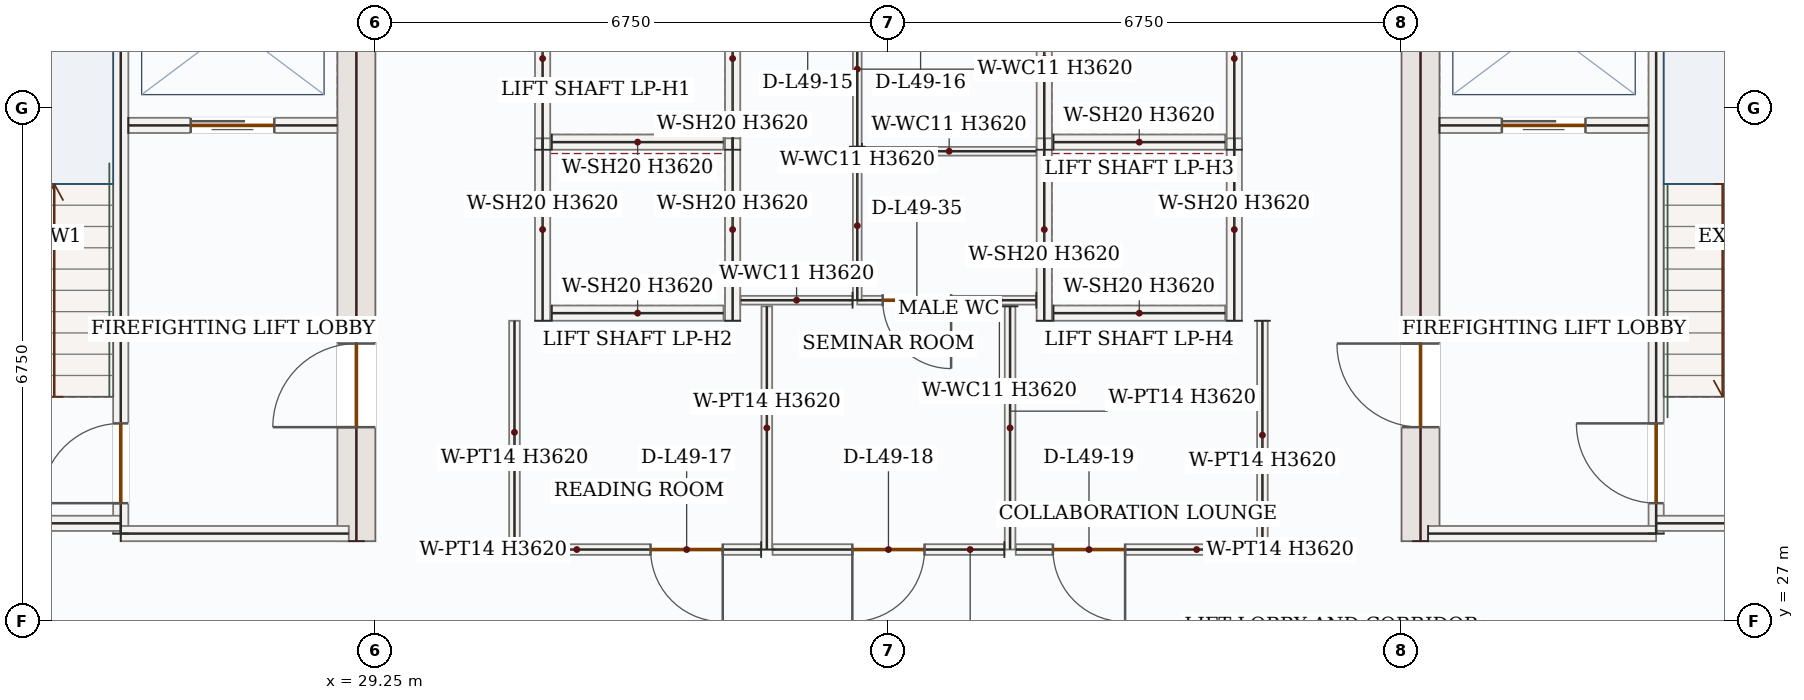
"""IFC4 building model, lengths in metres.
Left out: names, types, materials, properties, quantities, classifications, styles, units other than length and angle.
Written with IfcOpenShell. Run it as: python <this file> out.ifc"""

import sys

from ifc_helpers import new_model, si_unit, direction, frame, frame_2d, origin, place, context, subcontext, project, spatial, rectangle, extrude, source, transform, mapped, element, fill, save


model = new_model("IFC4")
c1 = context("Model", 3, precision=1e-05, world=origin(), true_north=direction((0.0, 1.0)))
c2 = subcontext(c1, "Body", "Model", "MODEL_VIEW")
j1 = project(units=[si_unit("LENGTHUNIT", "METRE"), si_unit("PLANEANGLEUNIT", "RADIAN")], contexts=[c1])
p1 = place(None, origin())
s1 = spatial("IfcSite", under=j1, at=p1, CompositionType="ELEMENT")
p2 = place(p1, origin())
s2 = spatial("IfcBuilding", under=s1, at=p2, CompositionType="ELEMENT")
p3 = place(p2, frame((0.0, 0.0, 209.7)))
s3 = spatial("IfcBuildingStorey", under=s2, at=p3, CompositionType="ELEMENT", Elevation=209.7)
p4 = place(p3, frame((29.0, 28.05, 0.0), z_axis=(0.0, 0.0, 1.0), x_axis=(0.0, 1.0, 0.0)))
e1 = element("IfcWall", 1, at=p4, inside=s3, PredefinedType="SHEAR", context=c2, shape_type="SweptSolid", body=[
    extrude(rectangle(XDim=8.55, YDim=0.5, at=frame_2d((4.275, 0.0))), origin(), (0.0, 0.0, 1.0), 3.62),
])
p5 = place(p4, frame((1.5, 0.0, 0.0)))
e2 = element("IfcOpeningElement", 2, at=p5, cuts=e1, PredefinedType="OPENING", context=c2, shape_type="SweptSolid", body=[
    extrude(rectangle(XDim=1.1, YDim=2.2, at=frame_2d((0.55, 1.1))), frame((0.0, 0.26, 0.0), z_axis=(0.0, -1.0, 0.0), x_axis=(1.0, 0.0, 0.0)), (0.0, 0.0, 1.0), 0.52),
])
p6 = place(p3, frame((43.0, 28.05, 0.0), z_axis=(0.0, 0.0, 1.0), x_axis=(0.0, 1.0, 0.0)))
e3 = element("IfcWall", 3, at=p6, inside=s3, PredefinedType="SHEAR", context=c2, shape_type="SweptSolid", body=[
    extrude(rectangle(XDim=8.55, YDim=0.5, at=frame_2d((4.275, 0.0))), origin(), (0.0, 0.0, 1.0), 3.62),
])
p7 = place(p6, frame((1.5, 0.0, 0.0)))
e4 = element("IfcOpeningElement", 4, at=p7, cuts=e3, PredefinedType="OPENING", context=c2, shape_type="SweptSolid", body=[
    extrude(rectangle(XDim=1.1, YDim=2.2, at=frame_2d((0.55, 1.1))), frame((0.0, 0.26, 0.0), z_axis=(0.0, -1.0, 0.0), x_axis=(1.0, 0.0, 0.0)), (0.0, 0.0, 1.0), 0.52),
])
p8 = place(p3, frame((25.9, 28.15, 0.0), z_axis=(0.0, 0.0, 1.0), x_axis=(0.0, 1.0, 0.0)))
e5 = element("IfcWall", 5, at=p8, inside=s3, PredefinedType="SOLIDWALL", context=c2, shape_type="SweptSolid", body=[
    extrude(rectangle(XDim=8.0, YDim=0.2, at=frame_2d((4.0, 0.0))), origin(), (0.0, 0.0, 1.0), 3.62),
])
p9 = place(p8, frame((0.4, 0.0, 0.0)))
e6 = element("IfcOpeningElement", 6, at=p9, cuts=e5, PredefinedType="OPENING", context=c2, shape_type="SweptSolid", body=[
    extrude(rectangle(XDim=1.05, YDim=2.15, at=frame_2d((0.525, 1.075))), frame((0.0, 0.11, 0.0), z_axis=(0.0, -1.0, 0.0), x_axis=(1.0, 0.0, 0.0)), (0.0, 0.0, 1.0), 0.22),
])
p10 = place(p3, frame((46.1, 28.15, 0.0), z_axis=(0.0, 0.0, 1.0), x_axis=(0.0, 1.0, 0.0)))
e7 = element("IfcWall", 7, at=p10, inside=s3, PredefinedType="SOLIDWALL", context=c2, shape_type="SweptSolid", body=[
    extrude(rectangle(XDim=8.0, YDim=0.2, at=frame_2d((4.0, 0.0))), origin(), (0.0, 0.0, 1.0), 3.62),
])
p11 = place(p10, frame((0.4, 0.0, 0.0)))
e8 = element("IfcOpeningElement", 8, at=p11, cuts=e7, PredefinedType="OPENING", context=c2, shape_type="SweptSolid", body=[
    extrude(rectangle(XDim=1.05, YDim=2.15, at=frame_2d((0.525, 1.075))), frame((0.0, 0.11, 0.0), z_axis=(0.0, -1.0, 0.0), x_axis=(1.0, 0.0, 0.0)), (0.0, 0.0, 1.0), 0.22),
])
m1 = source(origin(), c2, "Body", "SweptSolid", [
    extrude(rectangle(XDim=4.25, YDim=0.2, at=frame_2d((2.125, 0.0))), origin(), (0.0, 0.0, 1.0), 3.62),
])
p12 = place(p3, frame((21.65, 28.285, 0.0), z_axis=(0.0, 0.0, 1.0), x_axis=(1.0, 0.0, 0.0)))
e9 = element("IfcWall", 9, at=p12, inside=s3, PredefinedType="SOLIDWALL", context=c2, shape_type="MappedRepresentation", body=[
    mapped(m1, transform((0.0, 0.0, 0.0), x_axis=(1.0, 0.0, 0.0), y_axis=(0.0, 1.0, 0.0), z_axis=(0.0, 0.0, 1.0), scale=1.0)),
])
m2 = source(origin(), c2, "Body", "SweptSolid", [
    extrude(rectangle(XDim=3.0, YDim=0.2, at=frame_2d((1.5, 0.0))), origin(), (0.0, 0.0, 1.0), 3.62),
])
for number, where, z_axis, x_axis in (
    (10, (25.9, 28.15, 0.0), (0.0, 0.0, 1.0), (1.0, 0.0, 0.0)),
    (11, (43.1, 28.15, 0.0), (0.0, 0.0, 1.0), (1.0, 0.0, 0.0)),
):
    element("IfcWall", number, at=place(p3, frame(where, z_axis=z_axis, x_axis=x_axis)), inside=s3, PredefinedType="SOLIDWALL", context=c2, shape_type="MappedRepresentation", body=[
        mapped(m2, transform((0.0, 0.0, 0.0), x_axis=(1.0, 0.0, 0.0), y_axis=(0.0, 1.0, 0.0), z_axis=(0.0, 0.0, 1.0), scale=1.0)),
    ])
p13 = place(p3, frame((46.1, 28.285, 0.0), z_axis=(0.0, 0.0, 1.0), x_axis=(1.0, 0.0, 0.0)))
e12 = element("IfcWall", 12, at=p13, inside=s3, PredefinedType="SOLIDWALL", context=c2, shape_type="MappedRepresentation", body=[
    mapped(m1, transform((0.0, 0.0, 0.0), x_axis=(1.0, 0.0, 0.0), y_axis=(0.0, 1.0, 0.0), z_axis=(0.0, 0.0, 1.0), scale=1.0)),
])
p14 = place(p3, frame((26.0, 33.52, 0.0), z_axis=(0.0, 0.0, 1.0), x_axis=(1.0, 0.0, 0.0)))
e13 = element("IfcWall", 13, at=p14, inside=s3, PredefinedType="SOLIDWALL", context=c2, shape_type="SweptSolid", body=[
    extrude(rectangle(XDim=2.75, YDim=0.2, at=frame_2d((1.375, 0.0))), origin(), (0.0, 0.0, 1.0), 3.62),
])
p15 = place(p14, frame((0.82, 0.0, 0.0)))
e14 = element("IfcOpeningElement", 14, at=p15, cuts=e13, PredefinedType="OPENING", context=c2, shape_type="SweptSolid", body=[
    extrude(rectangle(XDim=1.1, YDim=2.15, at=frame_2d((0.55, 1.075))), frame((0.0, 0.11, 0.0), z_axis=(0.0, -1.0, 0.0), x_axis=(1.0, 0.0, 0.0)), (0.0, 0.0, 1.0), 0.22),
])
p16 = place(p3, frame((43.25, 33.52, 0.0), z_axis=(0.0, 0.0, 1.0), x_axis=(1.0, 0.0, 0.0)))
e15 = element("IfcWall", 15, at=p16, inside=s3, PredefinedType="SOLIDWALL", context=c2, shape_type="SweptSolid", body=[
    extrude(rectangle(XDim=2.75, YDim=0.2, at=frame_2d((1.375, 0.0))), origin(), (0.0, 0.0, 1.0), 3.62),
])
p17 = place(p16, frame((0.82, 0.0, 0.0)))
e16 = element("IfcOpeningElement", 16, at=p17, cuts=e15, PredefinedType="OPENING", context=c2, shape_type="SweptSolid", body=[
    extrude(rectangle(XDim=1.1, YDim=2.15, at=frame_2d((0.55, 1.075))), frame((0.0, 0.11, 0.0), z_axis=(0.0, -1.0, 0.0), x_axis=(1.0, 0.0, 0.0)), (0.0, 0.0, 1.0), 0.22),
])
m3 = source(origin(), c2, "Body", "SweptSolid", [
    extrude(rectangle(XDim=2.4, YDim=0.2, at=frame_2d((1.2, 0.0))), origin(), (0.0, 0.0, 1.0), 3.62),
])
for number, where, z_axis, x_axis in (
    (17, (31.45, 33.2, 0.0), (0.0, 0.0, 1.0), (0.0, 1.0, 0.0)),
    (18, (33.95, 33.2, 0.0), (0.0, 0.0, 1.0), (0.0, 1.0, 0.0)),
):
    element("IfcWall", number, at=place(p3, frame(where, z_axis=z_axis, x_axis=x_axis)), inside=s3, PredefinedType="SOLIDWALL", context=c2, shape_type="MappedRepresentation", body=[
        mapped(m3, transform((0.0, 0.0, 0.0), x_axis=(1.0, 0.0, 0.0), y_axis=(0.0, 1.0, 0.0), z_axis=(0.0, 0.0, 1.0), scale=1.0)),
    ])
m4 = source(origin(), c2, "Body", "SweptSolid", [
    extrude(rectangle(XDim=2.26, YDim=0.2, at=frame_2d((1.13, 0.0))), origin(), (0.0, 0.0, 1.0), 3.62),
])
p18 = place(p3, frame((31.57, 33.3, 0.0), z_axis=(0.0, 0.0, 1.0), x_axis=(1.0, 0.0, 0.0)))
e19 = element("IfcWall", 19, at=p18, inside=s3, PredefinedType="SOLIDWALL", context=c2, shape_type="MappedRepresentation", body=[
    mapped(m4, transform((0.0, 0.0, 0.0), x_axis=(1.0, 0.0, 0.0), y_axis=(0.0, 1.0, 0.0), z_axis=(0.0, 0.0, 1.0), scale=1.0)),
])
for number, where, z_axis, x_axis in (
    (20, (31.45, 30.95, 0.0), (0.0, 0.0, 1.0), (0.0, 1.0, 0.0)),
    (21, (33.95, 30.95, 0.0), (0.0, 0.0, 1.0), (0.0, 1.0, 0.0)),
):
    element("IfcWall", number, at=place(p3, frame(where, z_axis=z_axis, x_axis=x_axis)), inside=s3, PredefinedType="SOLIDWALL", context=c2, shape_type="MappedRepresentation", body=[
        mapped(m3, transform((0.0, 0.0, 0.0), x_axis=(1.0, 0.0, 0.0), y_axis=(0.0, 1.0, 0.0), z_axis=(0.0, 0.0, 1.0), scale=1.0)),
    ])
p19 = place(p3, frame((31.57, 31.05, 0.0), z_axis=(0.0, 0.0, 1.0), x_axis=(1.0, 0.0, 0.0)))
e22 = element("IfcWall", 22, at=p19, inside=s3, PredefinedType="SOLIDWALL", context=c2, shape_type="MappedRepresentation", body=[
    mapped(m4, transform((0.0, 0.0, 0.0), x_axis=(1.0, 0.0, 0.0), y_axis=(0.0, 1.0, 0.0), z_axis=(0.0, 0.0, 1.0), scale=1.0)),
])
for number, where, z_axis, x_axis in (
    (23, (38.05, 33.2, 0.0), (0.0, 0.0, 1.0), (0.0, 1.0, 0.0)),
    (24, (40.55, 33.2, 0.0), (0.0, 0.0, 1.0), (0.0, 1.0, 0.0)),
):
    element("IfcWall", number, at=place(p3, frame(where, z_axis=z_axis, x_axis=x_axis)), inside=s3, PredefinedType="SOLIDWALL", context=c2, shape_type="MappedRepresentation", body=[
        mapped(m3, transform((0.0, 0.0, 0.0), x_axis=(1.0, 0.0, 0.0), y_axis=(0.0, 1.0, 0.0), z_axis=(0.0, 0.0, 1.0), scale=1.0)),
    ])
p20 = place(p3, frame((38.17, 33.3, 0.0), z_axis=(0.0, 0.0, 1.0), x_axis=(1.0, 0.0, 0.0)))
e25 = element("IfcWall", 25, at=p20, inside=s3, PredefinedType="SOLIDWALL", context=c2, shape_type="MappedRepresentation", body=[
    mapped(m4, transform((0.0, 0.0, 0.0), x_axis=(1.0, 0.0, 0.0), y_axis=(0.0, 1.0, 0.0), z_axis=(0.0, 0.0, 1.0), scale=1.0)),
])
for number, where, z_axis, x_axis in (
    (26, (38.05, 30.95, 0.0), (0.0, 0.0, 1.0), (0.0, 1.0, 0.0)),
    (27, (40.55, 30.95, 0.0), (0.0, 0.0, 1.0), (0.0, 1.0, 0.0)),
):
    element("IfcWall", number, at=place(p3, frame(where, z_axis=z_axis, x_axis=x_axis)), inside=s3, PredefinedType="SOLIDWALL", context=c2, shape_type="MappedRepresentation", body=[
        mapped(m3, transform((0.0, 0.0, 0.0), x_axis=(1.0, 0.0, 0.0), y_axis=(0.0, 1.0, 0.0), z_axis=(0.0, 0.0, 1.0), scale=1.0)),
    ])
p21 = place(p3, frame((38.17, 31.05, 0.0), z_axis=(0.0, 0.0, 1.0), x_axis=(1.0, 0.0, 0.0)))
e28 = element("IfcWall", 28, at=p21, inside=s3, PredefinedType="SOLIDWALL", context=c2, shape_type="MappedRepresentation", body=[
    mapped(m4, transform((0.0, 0.0, 0.0), x_axis=(1.0, 0.0, 0.0), y_axis=(0.0, 1.0, 0.0), z_axis=(0.0, 0.0, 1.0), scale=1.0)),
])
p22 = place(p3, frame((37.945, 31.22, 0.0), z_axis=(0.0, 0.0, 1.0), x_axis=(-1.0, 0.0, 0.0)))
e29 = element("IfcWall", 29, at=p22, inside=s3, PredefinedType="PARTITIONING", context=c2, shape_type="SweptSolid", body=[
    extrude(rectangle(XDim=2.355, YDim=0.115, at=frame_2d((1.177, 0.0))), origin(), (0.0, 0.0, 1.0), 3.62),
])
p23 = place(p22, frame((1.121, 0.0, 0.0)))
e30 = element("IfcOpeningElement", 30, at=p23, cuts=e29, PredefinedType="OPENING", context=c2, shape_type="SweptSolid", body=[
    extrude(rectangle(XDim=0.9, YDim=2.1, at=frame_2d((0.45, 1.05))), frame((0.0, 0.067, 0.0), z_axis=(0.0, -1.0, 0.0), x_axis=(1.0, 0.0, 0.0)), (0.0, 0.0, 1.0), 0.135),
])
m5 = source(origin(), c2, "Body", "SweptSolid", [
    extrude(rectangle(XDim=1.96, YDim=0.115, at=frame_2d((0.98, 0.0))), origin(), (0.0, 0.0, 1.0), 3.62),
])
p24 = place(p3, frame((35.59, 31.22, 0.0), z_axis=(0.0, 0.0, 1.0), x_axis=(0.0, 1.0, 0.0)))
e31 = element("IfcWall", 31, at=p24, inside=s3, PredefinedType="PARTITIONING", context=c2, shape_type="MappedRepresentation", body=[
    mapped(m5, transform((0.0, 0.0, 0.0), x_axis=(1.0, 0.0, 0.0), y_axis=(0.0, 1.0, 0.0), z_axis=(0.0, 0.0, 1.0), scale=1.0)),
])
m6 = source(origin(), c2, "Body", "SweptSolid", [
    extrude(rectangle(XDim=2.292, YDim=0.115, at=frame_2d((1.146, 0.0))), origin(), (0.0, 0.0, 1.0), 3.62),
])
p25 = place(p3, frame((35.653, 33.18, 0.0), z_axis=(0.0, 0.0, 1.0), x_axis=(1.0, 0.0, 0.0)))
e32 = element("IfcWall", 32, at=p25, inside=s3, PredefinedType="PARTITIONING", context=c2, shape_type="MappedRepresentation", body=[
    mapped(m6, transform((0.0, 0.0, 0.0), x_axis=(1.0, 0.0, 0.0), y_axis=(0.0, 1.0, 0.0), z_axis=(0.0, 0.0, 1.0), scale=1.0)),
])
m7 = source(origin(), c2, "Body", "SweptSolid", [
    extrude(rectangle(XDim=2.04, YDim=0.115, at=frame_2d((1.02, 0.0))), origin(), (0.0, 0.0, 1.0), 3.62),
])
p26 = place(p3, frame((35.59, 33.24, 0.0), z_axis=(0.0, 0.0, 1.0), x_axis=(0.0, 1.0, 0.0)))
e33 = element("IfcWall", 33, at=p26, inside=s3, PredefinedType="PARTITIONING", context=c2, shape_type="MappedRepresentation", body=[
    mapped(m7, transform((0.0, 0.0, 0.0), x_axis=(1.0, 0.0, 0.0), y_axis=(0.0, 1.0, 0.0), z_axis=(0.0, 0.0, 1.0), scale=1.0)),
])
m8 = source(origin(), c2, "Body", "SweptSolid", [
    extrude(rectangle(XDim=1.473, YDim=0.115, at=frame_2d((0.736, 0.0))), origin(), (0.0, 0.0, 1.0), 3.62),
])
p27 = place(p3, frame((35.528, 31.22, 0.0), z_axis=(0.0, 0.0, 1.0), x_axis=(-1.0, 0.0, 0.0)))
e34 = element("IfcWall", 34, at=p27, inside=s3, PredefinedType="PARTITIONING", context=c2, shape_type="MappedRepresentation", body=[
    mapped(m8, transform((0.0, 0.0, 0.0), x_axis=(1.0, 0.0, 0.0), y_axis=(0.0, 1.0, 0.0), z_axis=(0.0, 0.0, 1.0), scale=1.0)),
])
m9 = source(origin(), c2, "Body", "SweptSolid", [
    extrude(rectangle(XDim=3.2, YDim=0.14, at=frame_2d((1.6, 0.0))), origin(), (0.0, 0.0, 1.0), 3.62),
])
for number, where, z_axis, x_axis in (
    (35, (34.4, 27.94, 0.0), (0.0, 0.0, 1.0), (0.0, 1.0, 0.0)),
    (36, (37.6, 31.14, 0.0), (0.0, 0.0, 1.0), (0.0, -1.0, 0.0)),
):
    element("IfcWall", number, at=place(p3, frame(where, z_axis=z_axis, x_axis=x_axis)), inside=s3, PredefinedType="PARTITIONING", context=c2, shape_type="MappedRepresentation", body=[
        mapped(m9, transform((0.0, 0.0, 0.0), x_axis=(1.0, 0.0, 0.0), y_axis=(0.0, 1.0, 0.0), z_axis=(0.0, 0.0, 1.0), scale=1.0)),
    ])
p28 = place(p3, frame((37.525, 27.94, 0.0), z_axis=(0.0, 0.0, 1.0), x_axis=(-1.0, 0.0, 0.0)))
e37 = element("IfcWall", 37, at=p28, inside=s3, PredefinedType="PARTITIONING", context=c2, shape_type="SweptSolid", body=[
    extrude(rectangle(XDim=3.05, YDim=0.14, at=frame_2d((1.525, 0.0))), origin(), (0.0, 0.0, 1.0), 3.62),
])
p29 = place(p28, frame((1.05, 0.0, 0.0)))
e38 = element("IfcOpeningElement", 38, at=p29, cuts=e37, PredefinedType="OPENING", context=c2, shape_type="SweptSolid", body=[
    extrude(rectangle(XDim=0.95, YDim=2.15, at=frame_2d((0.475, 1.075))), frame((0.0, 0.08, 0.0), z_axis=(0.0, -1.0, 0.0), x_axis=(1.0, 0.0, 0.0)), (0.0, 0.0, 1.0), 0.16),
])
p30 = place(p3, frame((34.325, 27.94, 0.0), z_axis=(0.0, 0.0, 1.0), x_axis=(-1.0, 0.0, 0.0)))
e39 = element("IfcWall", 39, at=p30, inside=s3, PredefinedType="PARTITIONING", context=c2, shape_type="SweptSolid", body=[
    extrude(rectangle(XDim=3.245, YDim=0.14, at=frame_2d((1.623, 0.0))), origin(), (0.0, 0.0, 1.0), 3.62),
])
p31 = place(p30, frame((0.505, 0.0, 0.0)))
e40 = element("IfcOpeningElement", 40, at=p31, cuts=e39, PredefinedType="OPENING", context=c2, shape_type="SweptSolid", body=[
    extrude(rectangle(XDim=0.95, YDim=2.15, at=frame_2d((0.475, 1.075))), frame((0.0, 0.08, 0.0), z_axis=(0.0, -1.0, 0.0), x_axis=(1.0, 0.0, 0.0)), (0.0, 0.0, 1.0), 0.16),
])
m10 = source(origin(), c2, "Body", "SweptSolid", [
    extrude(rectangle(XDim=2.935, YDim=0.14, at=frame_2d((1.468, 0.0))), origin(), (0.0, 0.0, 1.0), 3.62),
])
p32 = place(p3, frame((31.08, 28.015, 0.0), z_axis=(0.0, 0.0, 1.0), x_axis=(0.0, 1.0, 0.0)))
e41 = element("IfcWall", 41, at=p32, inside=s3, PredefinedType="PARTITIONING", context=c2, shape_type="MappedRepresentation", body=[
    mapped(m10, transform((0.0, 0.0, 0.0), x_axis=(1.0, 0.0, 0.0), y_axis=(0.0, 1.0, 0.0), z_axis=(0.0, 0.0, 1.0), scale=1.0)),
])
m11 = source(origin(), c2, "Body", "SweptSolid", [
    extrude(rectangle(XDim=3.01, YDim=0.14, at=frame_2d((1.505, 0.0))), origin(), (0.0, 0.0, 1.0), 3.62),
])
p33 = place(p3, frame((40.92, 30.95, 0.0), z_axis=(0.0, 0.0, 1.0), x_axis=(0.0, -1.0, 0.0)))
e42 = element("IfcWall", 42, at=p33, inside=s3, PredefinedType="PARTITIONING", context=c2, shape_type="MappedRepresentation", body=[
    mapped(m11, transform((0.0, 0.0, 0.0), x_axis=(1.0, 0.0, 0.0), y_axis=(0.0, 1.0, 0.0), z_axis=(0.0, 0.0, 1.0), scale=1.0)),
])
p34 = place(p3, frame((40.845, 27.94, 0.0), z_axis=(0.0, 0.0, 1.0), x_axis=(-1.0, 0.0, 0.0)))
e43 = element("IfcWall", 43, at=p34, inside=s3, PredefinedType="PARTITIONING", context=c2, shape_type="SweptSolid", body=[
    extrude(rectangle(XDim=3.17, YDim=0.14, at=frame_2d((1.585, 0.0))), origin(), (0.0, 0.0, 1.0), 3.62),
])
p35 = place(p34, frame((1.732, 0.0, 0.0)))
e44 = element("IfcOpeningElement", 44, at=p35, cuts=e43, PredefinedType="OPENING", context=c2, shape_type="SweptSolid", body=[
    extrude(rectangle(XDim=0.95, YDim=2.15, at=frame_2d((0.475, 1.075))), frame((0.0, 0.08, 0.0), z_axis=(0.0, -1.0, 0.0), x_axis=(1.0, 0.0, 0.0)), (0.0, 0.0, 1.0), 0.16),
])
m12 = source(origin(), c2, "Body", "SweptSolid", [
    extrude(rectangle(XDim=1.05, YDim=2.15, at=frame_2d((0.525, 1.075))), frame((0.0, 0.025, 0.0), z_axis=(0.0, -1.0, 0.0), x_axis=(1.0, 0.0, 0.0)), (0.0, 0.0, 1.0), 0.05),
])
p36 = place(p9, origin())
e45 = element("IfcDoor", 45, at=p36, inside=s3, OperationType="SINGLE_SWING_LEFT", PredefinedType="DOOR", context=c2, shape_type="MappedRepresentation", body=[
    mapped(m12, transform((0.0, 0.0, 0.0), x_axis=(1.0, 0.0, 0.0), y_axis=(0.0, 1.0, 0.0), z_axis=(0.0, 0.0, 1.0), scale=1.0)),
])
fill(e6, e45)
p37 = place(p11, origin())
e46 = element("IfcDoor", 46, at=p37, inside=s3, OperationType="SINGLE_SWING_RIGHT", PredefinedType="DOOR", context=c2, shape_type="MappedRepresentation", body=[
    mapped(m12, transform((0.0, 0.0, 0.0), x_axis=(1.0, 0.0, 0.0), y_axis=(0.0, 1.0, 0.0), z_axis=(0.0, 0.0, 1.0), scale=1.0)),
])
fill(e8, e46)
m13 = source(origin(), c2, "Body", "SweptSolid", [
    extrude(rectangle(XDim=1.1, YDim=2.15, at=frame_2d((0.55, 1.075))), frame((0.0, 0.025, 0.0), z_axis=(0.0, -1.0, 0.0), x_axis=(1.0, 0.0, 0.0)), (0.0, 0.0, 1.0), 0.05),
])
p38 = place(p15, origin())
e47 = element("IfcDoor", 47, at=p38, inside=s3, OperationType="DOUBLE_DOOR_SLIDING", PredefinedType="DOOR", context=c2, shape_type="MappedRepresentation", body=[
    mapped(m13, transform((0.0, 0.0, 0.0), x_axis=(1.0, 0.0, 0.0), y_axis=(0.0, 1.0, 0.0), z_axis=(0.0, 0.0, 1.0), scale=1.0)),
])
fill(e14, e47)
p39 = place(p17, origin())
e48 = element("IfcDoor", 48, at=p39, inside=s3, OperationType="DOUBLE_DOOR_SLIDING", PredefinedType="DOOR", context=c2, shape_type="MappedRepresentation", body=[
    mapped(m13, transform((0.0, 0.0, 0.0), x_axis=(1.0, 0.0, 0.0), y_axis=(0.0, 1.0, 0.0), z_axis=(0.0, 0.0, 1.0), scale=1.0)),
])
fill(e16, e48)
m14 = source(origin(), c2, "Body", "SweptSolid", [
    extrude(rectangle(XDim=1.1, YDim=2.2, at=frame_2d((0.55, 1.1))), frame((0.0, 0.025, 0.0), z_axis=(0.0, -1.0, 0.0), x_axis=(1.0, 0.0, 0.0)), (0.0, 0.0, 1.0), 0.05),
])
p40 = place(p5, origin())
e49 = element("IfcDoor", 49, at=p40, inside=s3, OperationType="SINGLE_SWING_LEFT", PredefinedType="DOOR", context=c2, shape_type="MappedRepresentation", body=[
    mapped(m14, transform((0.0, 0.0, 0.0), x_axis=(1.0, 0.0, 0.0), y_axis=(0.0, 1.0, 0.0), z_axis=(0.0, 0.0, 1.0), scale=1.0)),
])
fill(e2, e49)
p41 = place(p7, origin())
e50 = element("IfcDoor", 50, at=p41, inside=s3, OperationType="SINGLE_SWING_RIGHT", PredefinedType="DOOR", context=c2, shape_type="MappedRepresentation", body=[
    mapped(m14, transform((0.0, 0.0, 0.0), x_axis=(1.0, 0.0, 0.0), y_axis=(0.0, 1.0, 0.0), z_axis=(0.0, 0.0, 1.0), scale=1.0)),
])
fill(e4, e50)
m15 = source(origin(), c2, "Body", "SweptSolid", [
    extrude(rectangle(XDim=0.95, YDim=2.15, at=frame_2d((0.475, 1.075))), frame((0.0, 0.025, 0.0), z_axis=(0.0, -1.0, 0.0), x_axis=(1.0, 0.0, 0.0)), (0.0, 0.0, 1.0), 0.05),
])
p42 = place(p31, origin())
e51 = element("IfcDoor", 51, at=p42, inside=s3, OperationType="SINGLE_SWING_LEFT", PredefinedType="DOOR", context=c2, shape_type="MappedRepresentation", body=[
    mapped(m15, transform((0.0, 0.0, 0.0), x_axis=(1.0, 0.0, 0.0), y_axis=(0.0, 1.0, 0.0), z_axis=(0.0, 0.0, 1.0), scale=1.0)),
])
fill(e40, e51)
p43 = place(p29, origin())
e52 = element("IfcDoor", 52, at=p43, inside=s3, OperationType="SINGLE_SWING_RIGHT", PredefinedType="DOOR", context=c2, shape_type="MappedRepresentation", body=[
    mapped(m15, transform((0.0, 0.0, 0.0), x_axis=(1.0, 0.0, 0.0), y_axis=(0.0, 1.0, 0.0), z_axis=(0.0, 0.0, 1.0), scale=1.0)),
])
fill(e38, e52)
p44 = place(p35, origin())
e53 = element("IfcDoor", 53, at=p44, inside=s3, OperationType="SINGLE_SWING_LEFT", PredefinedType="DOOR", context=c2, shape_type="MappedRepresentation", body=[
    mapped(m15, transform((0.0, 0.0, 0.0), x_axis=(1.0, 0.0, 0.0), y_axis=(0.0, 1.0, 0.0), z_axis=(0.0, 0.0, 1.0), scale=1.0)),
])
fill(e44, e53)
m16 = source(origin(), c2, "Body", "SweptSolid", [
    extrude(rectangle(XDim=0.9, YDim=2.1, at=frame_2d((0.45, 1.05))), frame((0.0, 0.025, 0.0), z_axis=(0.0, -1.0, 0.0), x_axis=(1.0, 0.0, 0.0)), (0.0, 0.0, 1.0), 0.05),
])
p45 = place(p23, origin())
e54 = element("IfcDoor", 54, at=p45, inside=s3, OperationType="SINGLE_SWING_LEFT", PredefinedType="DOOR", context=c2, shape_type="MappedRepresentation", body=[
    mapped(m16, transform((0.0, 0.0, 0.0), x_axis=(1.0, 0.0, 0.0), y_axis=(0.0, 1.0, 0.0), z_axis=(0.0, 0.0, 1.0), scale=1.0)),
])
fill(e30, e54)
save(model, sys.argv[1])
